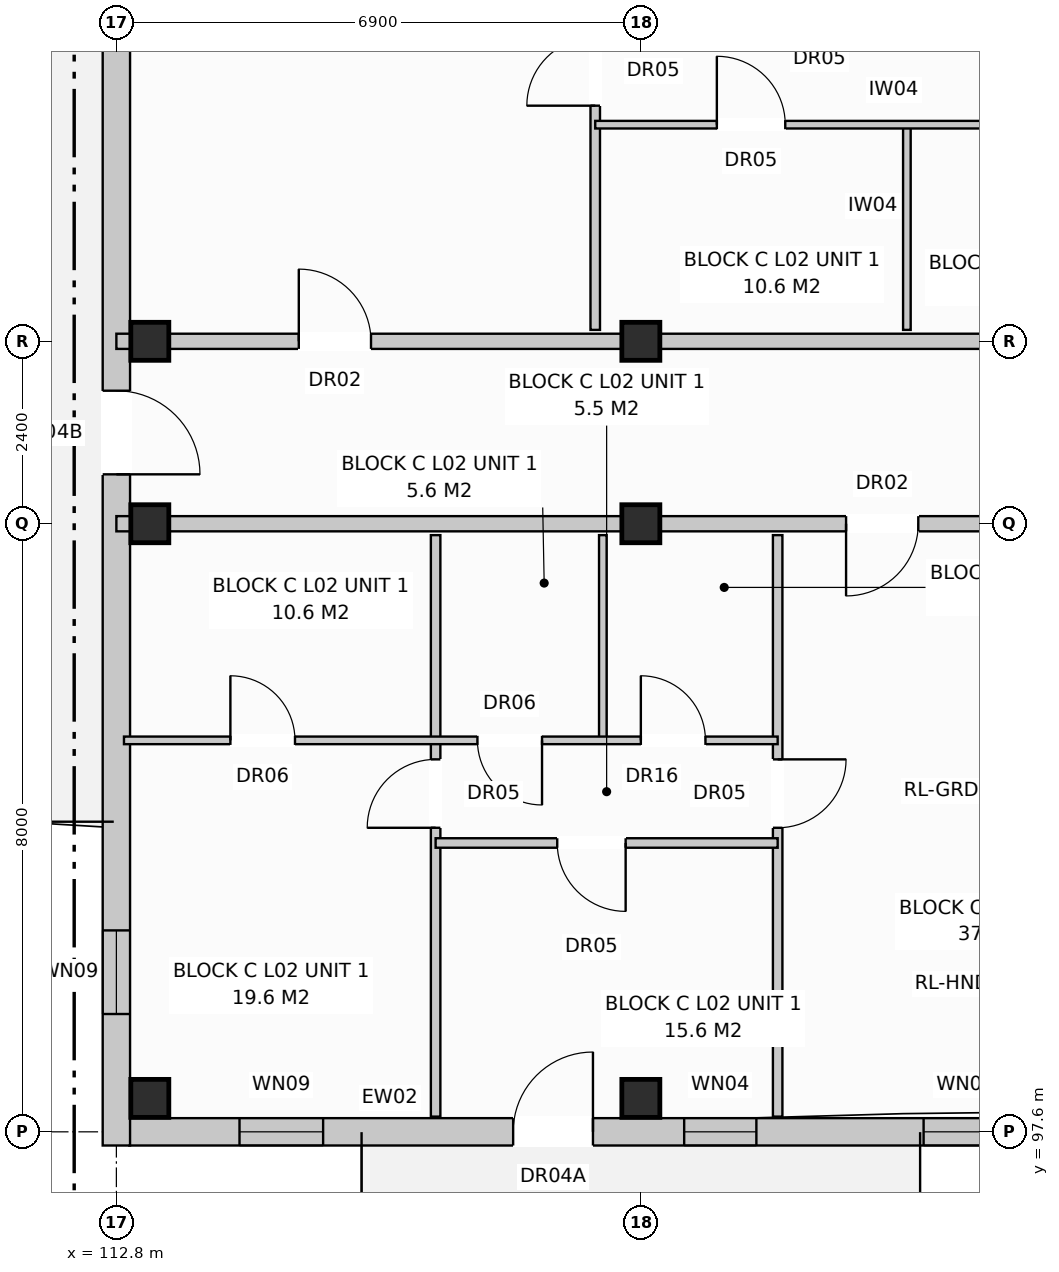
"""IFC4 building model, lengths in metres.
Left out: names, types, materials, properties, quantities, classifications, styles, units other than length and angle.
Written with IfcOpenShell. Run it as: python <this file> out.ifc"""

import sys

from ifc_helpers import new_model, si_unit, direction, frame, frame_2d, origin, origin_with_axes, origin_2d, place, context, subcontext, project, spatial, rectangle, extrude, element, fill, save


model = new_model("IFC4")
c1 = context("Model", 3, precision=1e-05, world=origin(), true_north=direction((0.0, 1.0)))
c2 = subcontext(c1, "Body", "Model", "MODEL_VIEW")
j1 = project(units=[si_unit("LENGTHUNIT", "METRE"), si_unit("PLANEANGLEUNIT", "RADIAN")], contexts=[c1])
p1 = place(None, origin())
s1 = spatial("IfcSite", under=j1, at=p1, CompositionType="ELEMENT")
p2 = place(p1, origin())
s2 = spatial("IfcBuilding", under=s1, at=p2, CompositionType="ELEMENT")
p3 = place(p2, frame((0.0, 0.0, 8.0)))
s3 = spatial("IfcBuildingStorey", under=s2, at=p3, CompositionType="ELEMENT", Elevation=8.0)
for number, where, z_axis, x_axis in (
    (1, (113.24, 98.04, 0.0), (0.0, 0.0, 1.0), (1.0, 0.0, 0.0)),
    (2, (113.24, 105.6, 0.0), (0.0, 0.0, 1.0), (1.0, 0.0, 0.0)),
    (3, (113.24, 108.0, 0.0), (0.0, 0.0, 1.0), (1.0, 0.0, 0.0)),
    (4, (119.7, 98.04, 0.0), (0.0, 0.0, 1.0), (1.0, 0.0, 0.0)),
    (5, (119.7, 105.6, 0.0), (0.0, 0.0, 1.0), (1.0, 0.0, 0.0)),
    (6, (119.7, 108.0, 0.0), (0.0, 0.0, 1.0), (1.0, 0.0, 0.0)),
):
    element("IfcColumn", number, at=place(p3, frame(where, z_axis=z_axis, x_axis=x_axis)), inside=s3, PredefinedType="COLUMN", context=c2, shape_type="SweptSolid", body=[
        extrude(rectangle(XDim=0.5, YDim=0.5, at=origin_2d()), origin(), (0.0, 0.0, 1.0), 3.2),
    ])
p4 = place(p3, frame((112.97, 97.6, 0.0), z_axis=(0.0, 0.0, 1.0), x_axis=(1.0, 0.0, 0.0)))
e7 = element("IfcWall", 7, at=p4, inside=s3, PredefinedType="STANDARD", context=c2, shape_type="SweptSolid", body=[
    extrude(rectangle(XDim=14.08, YDim=0.36, at=frame_2d((7.04, 0.0))), origin(), (0.0, 0.0, 1.0), 2.94),
])
p5 = place(p4, frame((5.05, 0.0, 0.0)))
e8 = element("IfcOpeningElement", 8, at=p5, cuts=e7, PredefinedType="OPENING", context=c2, shape_type="SweptSolid", body=[
    extrude(rectangle(XDim=1.05, YDim=2.12, at=frame_2d((0.525, 1.06))), frame((0.0, 0.192, 0.0), z_axis=(0.0, -1.0, 0.0), x_axis=(1.0, 0.0, 0.0)), (0.0, 0.0, 1.0), 0.384),
])
p6 = place(p4, frame((1.45, 0.0, 0.72)))
e9 = element("IfcOpeningElement", 9, at=p6, cuts=e7, PredefinedType="OPENING", context=c2, shape_type="SweptSolid", body=[
    extrude(rectangle(XDim=1.1, YDim=1.5, at=frame_2d((0.55, 0.75))), frame((0.0, 0.192, 0.0), z_axis=(0.0, -1.0, 0.0), x_axis=(1.0, 0.0, 0.0)), (0.0, 0.0, 1.0), 0.384),
])
p7 = place(p4, frame((7.3, 0.0, 0.9)))
e10 = element("IfcOpeningElement", 10, at=p7, cuts=e7, PredefinedType="OPENING", context=c2, shape_type="SweptSolid", body=[
    extrude(rectangle(XDim=0.95, YDim=1.55, at=frame_2d((0.475, 0.775))), frame((0.0, 0.192, 0.0), z_axis=(0.0, -1.0, 0.0), x_axis=(1.0, 0.0, 0.0)), (0.0, 0.0, 1.0), 0.384),
])
p8 = place(p4, frame((10.45, 0.0, 0.72)))
e11 = element("IfcOpeningElement", 11, at=p8, cuts=e7, PredefinedType="OPENING", context=c2, shape_type="SweptSolid", body=[
    extrude(rectangle(XDim=1.1, YDim=1.5, at=frame_2d((0.55, 0.75))), frame((0.0, 0.192, 0.0), z_axis=(0.0, -1.0, 0.0), x_axis=(1.0, 0.0, 0.0)), (0.0, 0.0, 1.0), 0.384),
])
p9 = place(p3, frame((112.8, 97.42, 0.0), z_axis=(0.0, 0.0, 1.0), x_axis=(0.0, 1.0, 0.0)))
e12 = element("IfcWall", 12, at=p9, inside=s3, PredefinedType="STANDARD", context=c2, shape_type="SweptSolid", body=[
    extrude(rectangle(XDim=18.76, YDim=0.36, at=frame_2d((9.38, 0.0))), origin(), (0.0, 0.0, 1.0), 2.94),
])
p10 = place(p9, frame((8.83, 0.0, 0.0)))
e13 = element("IfcOpeningElement", 13, at=p10, cuts=e12, PredefinedType="OPENING", context=c2, shape_type="SweptSolid", body=[
    extrude(rectangle(XDim=1.1, YDim=2.1, at=frame_2d((0.55, 1.05))), frame((0.0, 0.192, 0.0), z_axis=(0.0, -1.0, 0.0), x_axis=(1.0, 0.0, 0.0)), (0.0, 0.0, 1.0), 0.384),
])
p11 = place(p9, frame((1.73, 0.0, 0.72)))
e14 = element("IfcOpeningElement", 14, at=p11, cuts=e12, PredefinedType="OPENING", context=c2, shape_type="SweptSolid", body=[
    extrude(rectangle(XDim=1.1, YDim=1.5, at=frame_2d((0.55, 0.75))), frame((0.0, 0.192, 0.0), z_axis=(0.0, -1.0, 0.0), x_axis=(1.0, 0.0, 0.0)), (0.0, 0.0, 1.0), 0.384),
])
p12 = place(p9, frame((15.93, 0.0, 0.72)))
e15 = element("IfcOpeningElement", 15, at=p12, cuts=e12, PredefinedType="OPENING", context=c2, shape_type="SweptSolid", body=[
    extrude(rectangle(XDim=1.1, YDim=1.5, at=frame_2d((0.55, 0.75))), frame((0.0, 0.192, 0.0), z_axis=(0.0, -1.0, 0.0), x_axis=(1.0, 0.0, 0.0)), (0.0, 0.0, 1.0), 0.384),
])
p13 = place(p3, frame((112.8, 108.0, 0.0), z_axis=(0.0, 0.0, 1.0), x_axis=(1.0, 0.0, 0.0)))
e16 = element("IfcWall", 16, at=p13, inside=s3, PredefinedType="PARTITIONING", context=c2, shape_type="SweptSolid", body=[
    extrude(rectangle(XDim=20.7, YDim=0.2, at=frame_2d((10.35, 0.0))), origin(), (0.0, 0.0, 1.0), 2.38),
])
p14 = place(p13, frame((2.4, 0.0, 0.0)))
e17 = element("IfcOpeningElement", 17, at=p14, cuts=e16, PredefinedType="OPENING", context=c2, shape_type="SweptSolid", body=[
    extrude(rectangle(XDim=0.95, YDim=2.15, at=frame_2d((0.475, 1.075))), frame((0.0, 0.112, 0.0), z_axis=(0.0, -1.0, 0.0), x_axis=(1.0, 0.0, 0.0)), (0.0, 0.0, 1.0), 0.224),
])
p15 = place(p3, frame((119.1, 108.15, 0.0), z_axis=(0.0, 0.0, 1.0), x_axis=(0.0, 1.0, 0.0)))
e18 = element("IfcWall", 18, at=p15, inside=s3, PredefinedType="PARTITIONING", context=c2, shape_type="SweptSolid", body=[
    extrude(rectangle(XDim=7.65, YDim=0.125, at=frame_2d((3.825, 0.0))), origin(), (0.0, 0.0, 1.0), 2.94),
])
p16 = place(p15, frame((2.95, 0.0, 0.0)))
e19 = element("IfcOpeningElement", 19, at=p16, cuts=e18, PredefinedType="OPENING", context=c2, shape_type="SweptSolid", body=[
    extrude(rectangle(XDim=0.9, YDim=2.1, at=frame_2d((0.45, 1.05))), frame((0.0, 0.074, 0.0), z_axis=(0.0, -1.0, 0.0), x_axis=(1.0, 0.0, 0.0)), (0.0, 0.0, 1.0), 0.149),
])
p17 = place(p3, frame((123.2, 108.15, 0.0), z_axis=(0.0, 0.0, 1.0), x_axis=(0.0, 1.0, 0.0)))
e20 = element("IfcWall", 20, at=p17, inside=s3, PredefinedType="PARTITIONING", context=c2, shape_type="SweptSolid", body=[
    extrude(rectangle(XDim=2.7, YDim=0.1, at=frame_2d((1.35, 0.0))), origin(), (0.0, 0.0, 1.0), 2.94),
])
p18 = place(p3, frame((119.1, 110.85, 0.0), z_axis=(0.0, 0.0, 1.0), x_axis=(1.0, 0.0, 0.0)))
e21 = element("IfcWall", 21, at=p18, inside=s3, PredefinedType="PARTITIONING", context=c2, shape_type="SweptSolid", body=[
    extrude(rectangle(XDim=14.3, YDim=0.1, at=frame_2d((7.15, 0.0))), origin(), (0.0, 0.0, 1.0), 2.94),
])
p19 = place(p18, frame((1.6, 0.0, 0.0)))
e22 = element("IfcOpeningElement", 22, at=p19, cuts=e21, PredefinedType="OPENING", context=c2, shape_type="SweptSolid", body=[
    extrude(rectangle(XDim=0.9, YDim=2.1, at=frame_2d((0.45, 1.05))), frame((0.0, 0.062, 0.0), z_axis=(0.0, -1.0, 0.0), x_axis=(1.0, 0.0, 0.0)), (0.0, 0.0, 1.0), 0.124),
])
p20 = place(p18, frame((5.1, 0.0, 0.0)))
e23 = element("IfcOpeningElement", 23, at=p20, cuts=e21, PredefinedType="OPENING", context=c2, shape_type="SweptSolid", body=[
    extrude(rectangle(XDim=0.85, YDim=2.05, at=frame_2d((0.425, 1.025))), frame((0.0, 0.062, 0.0), z_axis=(0.0, -1.0, 0.0), x_axis=(1.0, 0.0, 0.0)), (0.0, 0.0, 1.0), 0.124),
])
p21 = place(p18, frame((8.2, 0.0, 0.0)))
e24 = element("IfcOpeningElement", 24, at=p21, cuts=e21, PredefinedType="OPENING", context=c2, shape_type="SweptSolid", body=[
    extrude(rectangle(XDim=0.85, YDim=2.05, at=frame_2d((0.425, 1.025))), frame((0.0, 0.062, 0.0), z_axis=(0.0, -1.0, 0.0), x_axis=(1.0, 0.0, 0.0)), (0.0, 0.0, 1.0), 0.124),
])
p22 = place(p18, frame((11.6, 0.0, 0.0)))
e25 = element("IfcOpeningElement", 25, at=p22, cuts=e21, PredefinedType="OPENING", context=c2, shape_type="SweptSolid", body=[
    extrude(rectangle(XDim=0.85, YDim=2.05, at=frame_2d((0.425, 1.025))), frame((0.0, 0.062, 0.0), z_axis=(0.0, -1.0, 0.0), x_axis=(1.0, 0.0, 0.0)), (0.0, 0.0, 1.0), 0.124),
])
p23 = place(p3, frame((112.8, 105.6, 0.0), z_axis=(0.0, 0.0, 1.0), x_axis=(1.0, 0.0, 0.0)))
e26 = element("IfcWall", 26, at=p23, inside=s3, PredefinedType="PARTITIONING", context=c2, shape_type="SweptSolid", body=[
    extrude(rectangle(XDim=13.8, YDim=0.2, at=frame_2d((6.9, 0.0))), origin(), (0.0, 0.0, 1.0), 2.38),
])
p24 = place(p23, frame((9.6, 0.0, 0.0)))
e27 = element("IfcOpeningElement", 27, at=p24, cuts=e26, PredefinedType="OPENING", context=c2, shape_type="SweptSolid", body=[
    extrude(rectangle(XDim=0.95, YDim=2.15, at=frame_2d((0.475, 1.075))), frame((0.0, 0.112, 0.0), z_axis=(0.0, -1.0, 0.0), x_axis=(1.0, 0.0, 0.0)), (0.0, 0.0, 1.0), 0.224),
])
p25 = place(p3, frame((121.5, 105.45, 0.0), z_axis=(0.0, 0.0, 1.0), x_axis=(0.0, -1.0, 0.0)))
e28 = element("IfcWall", 28, at=p25, inside=s3, PredefinedType="PARTITIONING", context=c2, shape_type="SweptSolid", body=[
    extrude(rectangle(XDim=7.65, YDim=0.125, at=frame_2d((3.825, 0.0))), origin(), (0.0, 0.0, 1.0), 2.94),
])
p26 = place(p25, frame((2.95, 0.0, 0.0)))
e29 = element("IfcOpeningElement", 29, at=p26, cuts=e28, PredefinedType="OPENING", context=c2, shape_type="SweptSolid", body=[
    extrude(rectangle(XDim=0.9, YDim=2.1, at=frame_2d((0.45, 1.05))), frame((0.0, 0.074, 0.0), z_axis=(0.0, -1.0, 0.0), x_axis=(1.0, 0.0, 0.0)), (0.0, 0.0, 1.0), 0.149),
])
p27 = place(p3, frame((117.0, 105.45, 0.0), z_axis=(0.0, 0.0, 1.0), x_axis=(0.0, -1.0, 0.0)))
e30 = element("IfcWall", 30, at=p27, inside=s3, PredefinedType="PARTITIONING", context=c2, shape_type="SweptSolid", body=[
    extrude(rectangle(XDim=7.65, YDim=0.125, at=frame_2d((3.825, 0.0))), origin(), (0.0, 0.0, 1.0), 2.94),
])
p28 = place(p27, frame((2.95, 0.0, 0.0)))
e31 = element("IfcOpeningElement", 31, at=p28, cuts=e30, PredefinedType="OPENING", context=c2, shape_type="SweptSolid", body=[
    extrude(rectangle(XDim=0.9, YDim=2.1, at=frame_2d((0.45, 1.05))), frame((0.0, 0.074, 0.0), z_axis=(0.0, -1.0, 0.0), x_axis=(1.0, 0.0, 0.0)), (0.0, 0.0, 1.0), 0.149),
])
p29 = place(p3, frame((119.2, 105.45, 0.0), z_axis=(0.0, 0.0, 1.0), x_axis=(0.0, -1.0, 0.0)))
e32 = element("IfcWall", 32, at=p29, inside=s3, PredefinedType="PARTITIONING", context=c2, shape_type="SweptSolid", body=[
    extrude(rectangle(XDim=2.7, YDim=0.1, at=frame_2d((1.35, 0.0))), origin(), (0.0, 0.0, 1.0), 2.94),
])
p30 = place(p3, frame((112.9, 102.75, 0.0), z_axis=(0.0, 0.0, 1.0), x_axis=(1.0, 0.0, 0.0)))
e33 = element("IfcWall", 33, at=p30, inside=s3, PredefinedType="PARTITIONING", context=c2, shape_type="SweptSolid", body=[
    extrude(rectangle(XDim=8.6, YDim=0.1, at=frame_2d((4.3, 0.0))), origin(), (0.0, 0.0, 1.0), 2.94),
])
p31 = place(p30, frame((1.4, 0.0, 0.0)))
e34 = element("IfcOpeningElement", 34, at=p31, cuts=e33, PredefinedType="OPENING", context=c2, shape_type="SweptSolid", body=[
    extrude(rectangle(XDim=0.85, YDim=2.05, at=frame_2d((0.425, 1.025))), frame((0.0, 0.062, 0.0), z_axis=(0.0, -1.0, 0.0), x_axis=(1.0, 0.0, 0.0)), (0.0, 0.0, 1.0), 0.124),
])
p32 = place(p30, frame((4.65, 0.0, 0.0)))
e35 = element("IfcOpeningElement", 35, at=p32, cuts=e33, PredefinedType="OPENING", context=c2, shape_type="SweptSolid", body=[
    extrude(rectangle(XDim=0.85, YDim=2.05, at=frame_2d((0.425, 1.025))), frame((0.0, 0.062, 0.0), z_axis=(0.0, -1.0, 0.0), x_axis=(1.0, 0.0, 0.0)), (0.0, 0.0, 1.0), 0.124),
])
p33 = place(p30, frame((6.8, 0.0, 0.0)))
e36 = element("IfcOpeningElement", 36, at=p33, cuts=e33, PredefinedType="OPENING", context=c2, shape_type="SweptSolid", body=[
    extrude(rectangle(XDim=0.85, YDim=2.1, at=frame_2d((0.425, 1.05))), frame((0.0, 0.062, 0.0), z_axis=(0.0, -1.0, 0.0), x_axis=(1.0, 0.0, 0.0)), (0.0, 0.0, 1.0), 0.124),
])
p34 = place(p3, frame((117.0, 101.4, 0.0), z_axis=(0.0, 0.0, 1.0), x_axis=(1.0, 0.0, 0.0)))
e37 = element("IfcWall", 37, at=p34, inside=s3, PredefinedType="PARTITIONING", context=c2, shape_type="SweptSolid", body=[
    extrude(rectangle(XDim=4.5, YDim=0.125, at=frame_2d((2.25, 0.0))), origin(), (0.0, 0.0, 1.0), 2.94),
])
p35 = place(p34, frame((1.6, 0.0, 0.0)))
e38 = element("IfcOpeningElement", 38, at=p35, cuts=e37, PredefinedType="OPENING", context=c2, shape_type="SweptSolid", body=[
    extrude(rectangle(XDim=0.9, YDim=2.1, at=frame_2d((0.45, 1.05))), frame((0.0, 0.074, 0.0), z_axis=(0.0, -1.0, 0.0), x_axis=(1.0, 0.0, 0.0)), (0.0, 0.0, 1.0), 0.149),
])
p36 = place(p5, origin_with_axes())
e39 = element("IfcDoor", 39, at=p36, inside=s3, OperationType="SINGLE_SWING_RIGHT", PredefinedType="DOOR", context=c2, shape_type="SweptSolid", body=[
    extrude(rectangle(XDim=1.05, YDim=2.12, at=frame_2d((0.525, 1.06))), frame((0.0, 0.025, 0.0), z_axis=(0.0, -1.0, 0.0), x_axis=(1.0, 0.0, 0.0)), (0.0, 0.0, 1.0), 0.05),
])
fill(e8, e39)
p37 = place(p6, origin_with_axes())
e40 = element("IfcWindow", 40, at=p37, inside=s3, PartitioningType="SINGLE_PANEL", PredefinedType="WINDOW", context=c2, shape_type="SweptSolid", body=[
    extrude(rectangle(XDim=1.1, YDim=1.5, at=frame_2d((0.55, 0.75))), frame((0.0, 0.03, 0.0), z_axis=(0.0, -1.0, 0.0), x_axis=(1.0, 0.0, 0.0)), (0.0, 0.0, 1.0), 0.06),
])
fill(e9, e40)
p38 = place(p7, origin_with_axes())
e41 = element("IfcWindow", 41, at=p38, inside=s3, PartitioningType="SINGLE_PANEL", PredefinedType="WINDOW", context=c2, shape_type="SweptSolid", body=[
    extrude(rectangle(XDim=0.95, YDim=1.55, at=frame_2d((0.475, 0.775))), frame((0.0, 0.03, 0.0), z_axis=(0.0, -1.0, 0.0), x_axis=(1.0, 0.0, 0.0)), (0.0, 0.0, 1.0), 0.06),
])
fill(e10, e41)
p39 = place(p8, origin_with_axes())
e42 = element("IfcWindow", 42, at=p39, inside=s3, PartitioningType="SINGLE_PANEL", PredefinedType="WINDOW", context=c2, shape_type="SweptSolid", body=[
    extrude(rectangle(XDim=1.1, YDim=1.5, at=frame_2d((0.55, 0.75))), frame((0.0, 0.03, 0.0), z_axis=(0.0, -1.0, 0.0), x_axis=(1.0, 0.0, 0.0)), (0.0, 0.0, 1.0), 0.06),
])
fill(e11, e42)
p40 = place(p10, frame((1.1, 0.0, 0.0), z_axis=(0.0, 0.0, 1.0), x_axis=(-1.0, 0.0, 0.0)))
e43 = element("IfcDoor", 43, at=p40, inside=s3, OperationType="SINGLE_SWING_LEFT", PredefinedType="DOOR", context=c2, shape_type="SweptSolid", body=[
    extrude(rectangle(XDim=1.1, YDim=2.1, at=frame_2d((0.55, 1.05))), frame((0.0, 0.025, 0.0), z_axis=(0.0, -1.0, 0.0), x_axis=(1.0, 0.0, 0.0)), (0.0, 0.0, 1.0), 0.05),
])
fill(e13, e43)
p41 = place(p11, origin_with_axes())
e44 = element("IfcWindow", 44, at=p41, inside=s3, PartitioningType="SINGLE_PANEL", PredefinedType="WINDOW", context=c2, shape_type="SweptSolid", body=[
    extrude(rectangle(XDim=1.1, YDim=1.5, at=frame_2d((0.55, 0.75))), frame((0.0, 0.03, 0.0), z_axis=(0.0, -1.0, 0.0), x_axis=(1.0, 0.0, 0.0)), (0.0, 0.0, 1.0), 0.06),
])
fill(e14, e44)
p42 = place(p14, origin_with_axes())
e45 = element("IfcDoor", 45, at=p42, inside=s3, OperationType="SINGLE_SWING_LEFT", PredefinedType="DOOR", context=c2, shape_type="SweptSolid", body=[
    extrude(rectangle(XDim=0.95, YDim=2.15, at=frame_2d((0.475, 1.075))), frame((0.0, 0.025, 0.0), z_axis=(0.0, -1.0, 0.0), x_axis=(1.0, 0.0, 0.0)), (0.0, 0.0, 1.0), 0.05),
])
fill(e17, e45)
p43 = place(p16, origin_with_axes())
e46 = element("IfcDoor", 46, at=p43, inside=s3, OperationType="SINGLE_SWING_LEFT", PredefinedType="DOOR", context=c2, shape_type="SweptSolid", body=[
    extrude(rectangle(XDim=0.9, YDim=2.1, at=frame_2d((0.45, 1.05))), frame((0.0, 0.025, 0.0), z_axis=(0.0, -1.0, 0.0), x_axis=(1.0, 0.0, 0.0)), (0.0, 0.0, 1.0), 0.05),
])
fill(e19, e46)
p44 = place(p19, origin_with_axes())
e47 = element("IfcDoor", 47, at=p44, inside=s3, OperationType="SINGLE_SWING_LEFT", PredefinedType="DOOR", context=c2, shape_type="SweptSolid", body=[
    extrude(rectangle(XDim=0.9, YDim=2.1, at=frame_2d((0.45, 1.05))), frame((0.0, 0.025, 0.0), z_axis=(0.0, -1.0, 0.0), x_axis=(1.0, 0.0, 0.0)), (0.0, 0.0, 1.0), 0.05),
])
fill(e22, e47)
p45 = place(p24, frame((0.95, 0.0, 0.0), z_axis=(0.0, 0.0, 1.0), x_axis=(-1.0, 0.0, 0.0)))
e48 = element("IfcDoor", 48, at=p45, inside=s3, OperationType="SINGLE_SWING_LEFT", PredefinedType="DOOR", context=c2, shape_type="SweptSolid", body=[
    extrude(rectangle(XDim=0.95, YDim=2.15, at=frame_2d((0.475, 1.075))), frame((0.0, 0.025, 0.0), z_axis=(0.0, -1.0, 0.0), x_axis=(1.0, 0.0, 0.0)), (0.0, 0.0, 1.0), 0.05),
])
fill(e27, e48)
p46 = place(p26, origin_with_axes())
e49 = element("IfcDoor", 49, at=p46, inside=s3, OperationType="SINGLE_SWING_LEFT", PredefinedType="DOOR", context=c2, shape_type="SweptSolid", body=[
    extrude(rectangle(XDim=0.9, YDim=2.1, at=frame_2d((0.45, 1.05))), frame((0.0, 0.025, 0.0), z_axis=(0.0, -1.0, 0.0), x_axis=(1.0, 0.0, 0.0)), (0.0, 0.0, 1.0), 0.05),
])
fill(e29, e49)
p47 = place(p28, frame((0.9, 0.0, 0.0), z_axis=(0.0, 0.0, 1.0), x_axis=(-1.0, 0.0, 0.0)))
e50 = element("IfcDoor", 50, at=p47, inside=s3, OperationType="SINGLE_SWING_RIGHT", PredefinedType="DOOR", context=c2, shape_type="SweptSolid", body=[
    extrude(rectangle(XDim=0.9, YDim=2.1, at=frame_2d((0.45, 1.05))), frame((0.0, 0.025, 0.0), z_axis=(0.0, -1.0, 0.0), x_axis=(1.0, 0.0, 0.0)), (0.0, 0.0, 1.0), 0.05),
])
fill(e31, e50)
p48 = place(p31, origin_with_axes())
e51 = element("IfcDoor", 51, at=p48, inside=s3, OperationType="SINGLE_SWING_LEFT", PredefinedType="DOOR", context=c2, shape_type="SweptSolid", body=[
    extrude(rectangle(XDim=0.85, YDim=2.05, at=frame_2d((0.425, 1.025))), frame((0.0, 0.025, 0.0), z_axis=(0.0, -1.0, 0.0), x_axis=(1.0, 0.0, 0.0)), (0.0, 0.0, 1.0), 0.05),
])
fill(e34, e51)
p49 = place(p32, frame((0.85, 0.0, 0.0), z_axis=(0.0, 0.0, 1.0), x_axis=(-1.0, 0.0, 0.0)))
e52 = element("IfcDoor", 52, at=p49, inside=s3, OperationType="SINGLE_SWING_RIGHT", PredefinedType="DOOR", context=c2, shape_type="SweptSolid", body=[
    extrude(rectangle(XDim=0.85, YDim=2.05, at=frame_2d((0.425, 1.025))), frame((0.0, 0.025, 0.0), z_axis=(0.0, -1.0, 0.0), x_axis=(1.0, 0.0, 0.0)), (0.0, 0.0, 1.0), 0.05),
])
fill(e35, e52)
p50 = place(p33, origin_with_axes())
e53 = element("IfcDoor", 53, at=p50, inside=s3, OperationType="SINGLE_SWING_LEFT", PredefinedType="DOOR", context=c2, shape_type="SweptSolid", body=[
    extrude(rectangle(XDim=0.85, YDim=2.1, at=frame_2d((0.425, 1.05))), frame((0.0, 0.025, 0.0), z_axis=(0.0, -1.0, 0.0), x_axis=(1.0, 0.0, 0.0)), (0.0, 0.0, 1.0), 0.05),
])
fill(e36, e53)
p51 = place(p35, frame((0.9, 0.0, 0.0), z_axis=(0.0, 0.0, 1.0), x_axis=(-1.0, 0.0, 0.0)))
e54 = element("IfcDoor", 54, at=p51, inside=s3, OperationType="SINGLE_SWING_RIGHT", PredefinedType="DOOR", context=c2, shape_type="SweptSolid", body=[
    extrude(rectangle(XDim=0.9, YDim=2.1, at=frame_2d((0.45, 1.05))), frame((0.0, 0.025, 0.0), z_axis=(0.0, -1.0, 0.0), x_axis=(1.0, 0.0, 0.0)), (0.0, 0.0, 1.0), 0.05),
])
fill(e38, e54)
save(model, sys.argv[1])
